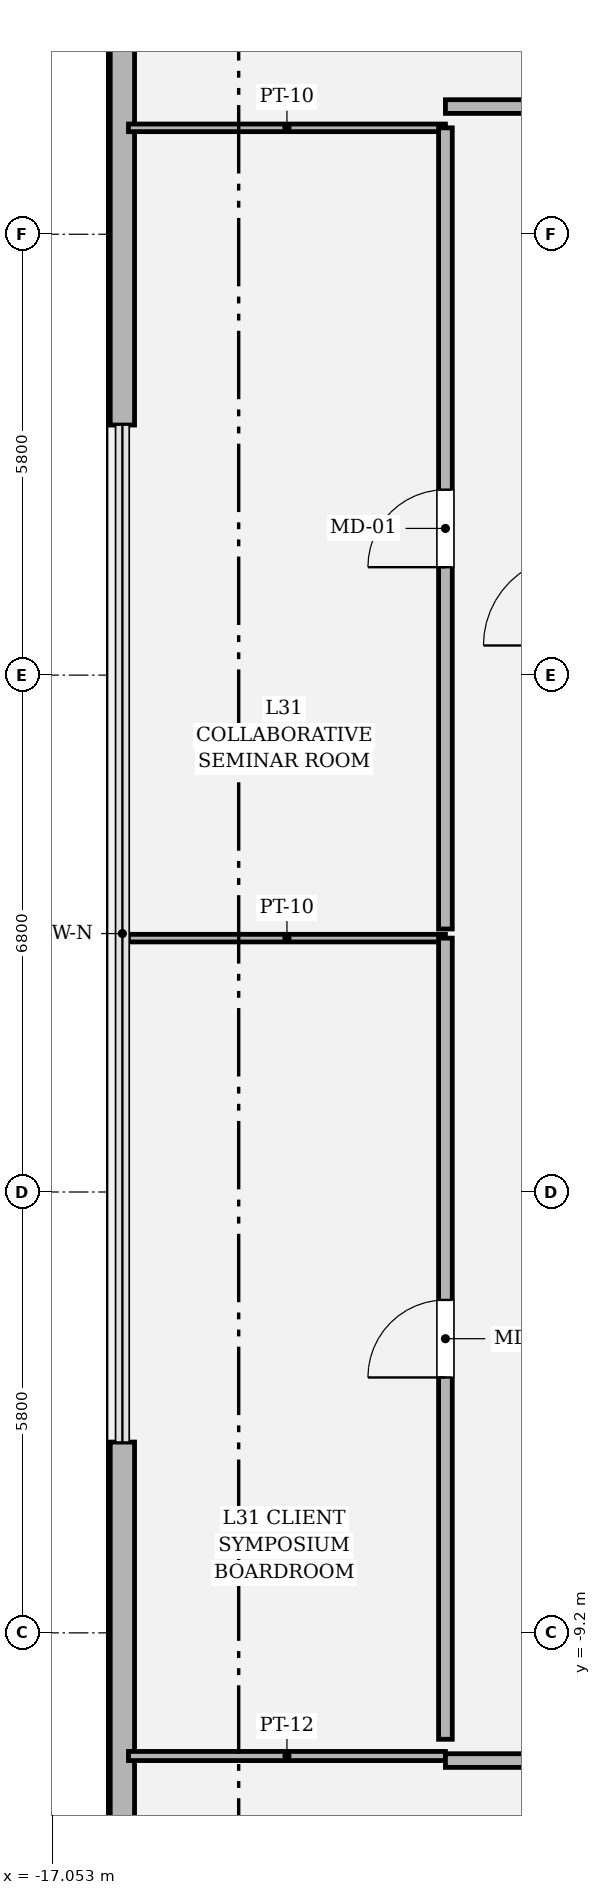
"""IFC4 building model, lengths in metres.
Left out: names, types, materials, properties, quantities, classifications, styles, units other than length and angle.
Written with IfcOpenShell. Run it as: python <this file> out.ifc"""

import sys

from ifc_helpers import new_model, si_unit, direction, frame, frame_2d, origin, place, context, subcontext, project, spatial, rectangle, extrude, element, fill, save


model = new_model("IFC4")
c1 = context("Model", 3, precision=1e-05, world=origin(), true_north=direction((0.0, 1.0)))
c2 = subcontext(c1, "Body", "Model", "MODEL_VIEW")
j1 = project(units=[si_unit("LENGTHUNIT", "METRE"), si_unit("PLANEANGLEUNIT", "RADIAN")], contexts=[c1])
p1 = place(None, origin())
s1 = spatial("IfcSite", under=j1, at=p1, CompositionType="ELEMENT")
p2 = place(p1, origin())
s2 = spatial("IfcBuilding", under=s1, at=p2, CompositionType="ELEMENT")
p3 = place(p2, frame((0.0, 0.0, 135.0)))
s3 = spatial("IfcBuildingStorey", under=s2, at=p3, CompositionType="ELEMENT", Elevation=135.0)
for number, where, z_axis, x_axis in (
    (1, (-16.13, 13.727, 0.0), (0.0, 0.0, 1.0), (0.0, -1.0, 0.0)),
    (2, (-16.13, -6.69, 0.0), (0.0, 0.0, 1.0), (0.0, -1.0, 0.0)),
):
    element("IfcWall", number, at=place(p3, frame(where, z_axis=z_axis, x_axis=x_axis)), inside=s3, PredefinedType="SOLIDWALL", context=c2, shape_type="SweptSolid", body=[
        extrude(rectangle(XDim=7.037, YDim=0.32, at=frame_2d((3.519, 0.0))), origin(), (0.0, 0.0, 1.0), 3.194),
    ])
p4 = place(p3, frame((-16.05, -10.82, 0.0), z_axis=(0.0, 0.0, 1.0), x_axis=(1.0, 0.0, 0.0)))
e3 = element("IfcWall", 3, at=p4, inside=s3, PredefinedType="PARTITIONING", context=c2, shape_type="SweptSolid", body=[
    extrude(rectangle(XDim=4.17, YDim=0.12, at=frame_2d((2.085, 0.0))), origin(), (0.0, 0.0, 1.0), 4.114),
])
p5 = place(p3, frame((-11.88, -10.88, 0.0), z_axis=(0.0, 0.0, 1.0), x_axis=(1.0, 0.0, 0.0)))
e4 = element("IfcWall", 4, at=p5, inside=s3, PredefinedType="PARTITIONING", context=c2, shape_type="SweptSolid", body=[
    extrude(rectangle(XDim=10.474, YDim=0.18, at=frame_2d((5.237, 0.0))), origin(), (0.0, 0.0, 1.0), 3.194),
])
p6 = place(p5, frame((4.712, 0.0, 0.0)))
e5 = element("IfcOpeningElement", 5, at=p6, cuts=e4, PredefinedType="OPENING", context=c2, shape_type="SweptSolid", body=[
    extrude(rectangle(XDim=1.05, YDim=2.2, at=frame_2d((0.525, 1.1))), frame((0.0, 0.1, 0.0), z_axis=(0.0, -1.0, 0.0), x_axis=(1.0, 0.0, 0.0)), (0.0, 0.0, 1.0), 0.2),
])
p7 = place(p3, frame((-16.05, -0.06, 0.0), z_axis=(0.0, 0.0, 1.0), x_axis=(1.0, 0.0, 0.0)))
e6 = element("IfcWall", 6, at=p7, inside=s3, PredefinedType="PARTITIONING", context=c2, shape_type="SweptSolid", body=[
    extrude(rectangle(XDim=4.17, YDim=0.1, at=frame_2d((2.085, 0.0))), origin(), (0.0, 0.0, 1.0), 4.52),
])
p8 = place(p3, frame((-11.88, -0.06, 0.0), z_axis=(0.0, 0.0, 1.0), x_axis=(0.0, -1.0, 0.0)))
e7 = element("IfcWall", 7, at=p8, inside=s3, PredefinedType="PARTITIONING", context=c2, shape_type="SweptSolid", body=[
    extrude(rectangle(XDim=10.54, YDim=0.18, at=frame_2d((5.27, 0.0))), origin(), (0.0, 0.0, 1.0), 3.194),
])
p9 = place(p8, frame((4.76, 0.0, 0.0)))
e8 = element("IfcOpeningElement", 8, at=p9, cuts=e7, PredefinedType="OPENING", context=c2, shape_type="SweptSolid", body=[
    extrude(rectangle(XDim=1.02, YDim=2.2, at=frame_2d((0.51, 1.1))), frame((0.0, 0.1, 0.0), z_axis=(0.0, -1.0, 0.0), x_axis=(1.0, 0.0, 0.0)), (0.0, 0.0, 1.0), 0.2),
])
p10 = place(p3, frame((-16.05, 10.6, 0.0), z_axis=(0.0, 0.0, 1.0), x_axis=(1.0, 0.0, 0.0)))
e9 = element("IfcWall", 9, at=p10, inside=s3, PredefinedType="PARTITIONING", context=c2, shape_type="SweptSolid", body=[
    extrude(rectangle(XDim=4.17, YDim=0.1, at=frame_2d((2.085, 0.0))), origin(), (0.0, 0.0, 1.0), 4.114),
])
p11 = place(p3, frame((-11.88, 10.6, 0.0), z_axis=(0.0, 0.0, 1.0), x_axis=(0.0, -1.0, 0.0)))
e10 = element("IfcWall", 10, at=p11, inside=s3, PredefinedType="PARTITIONING", context=c2, shape_type="SweptSolid", body=[
    extrude(rectangle(XDim=10.54, YDim=0.18, at=frame_2d((5.27, 0.0))), origin(), (0.0, 0.0, 1.0), 3.194),
])
p12 = place(p11, frame((4.76, 0.0, 0.0)))
e11 = element("IfcOpeningElement", 11, at=p12, cuts=e10, PredefinedType="OPENING", context=c2, shape_type="SweptSolid", body=[
    extrude(rectangle(XDim=1.02, YDim=2.2, at=frame_2d((0.51, 1.1))), frame((0.0, 0.1, 0.0), z_axis=(0.0, -1.0, 0.0), x_axis=(1.0, 0.0, 0.0)), (0.0, 0.0, 1.0), 0.2),
])
p13 = place(p3, frame((-1.406, 10.88, 0.0), z_axis=(0.0, 0.0, 1.0), x_axis=(-1.0, 0.0, 0.0)))
e12 = element("IfcWall", 12, at=p13, inside=s3, PredefinedType="PARTITIONING", context=c2, shape_type="SweptSolid", body=[
    extrude(rectangle(XDim=10.474, YDim=0.18, at=frame_2d((5.237, 0.0))), origin(), (0.0, 0.0, 1.0), 3.194),
])
p14 = place(p13, frame((4.712, 0.0, 0.0)))
e13 = element("IfcOpeningElement", 13, at=p14, cuts=e12, PredefinedType="OPENING", context=c2, shape_type="SweptSolid", body=[
    extrude(rectangle(XDim=1.05, YDim=2.2, at=frame_2d((0.525, 1.1))), frame((0.0, 0.1, 0.0), z_axis=(0.0, -1.0, 0.0), x_axis=(1.0, 0.0, 0.0)), (0.0, 0.0, 1.0), 0.2),
])
p15 = place(p9, origin())
e14 = element("IfcDoor", 14, at=p15, inside=s3, OperationType="SINGLE_SWING_RIGHT", PredefinedType="DOOR", context=c2, shape_type="SweptSolid", body=[
    extrude(rectangle(XDim=1.02, YDim=2.2, at=frame_2d((0.51, 1.1))), frame((0.0, 0.025, 0.0), z_axis=(0.0, -1.0, 0.0), x_axis=(1.0, 0.0, 0.0)), (0.0, 0.0, 1.0), 0.05),
])
fill(e8, e14)
p16 = place(p12, origin())
e15 = element("IfcDoor", 15, at=p16, inside=s3, OperationType="SINGLE_SWING_RIGHT", PredefinedType="DOOR", context=c2, shape_type="SweptSolid", body=[
    extrude(rectangle(XDim=1.02, YDim=2.2, at=frame_2d((0.51, 1.1))), frame((0.0, 0.025, 0.0), z_axis=(0.0, -1.0, 0.0), x_axis=(1.0, 0.0, 0.0)), (0.0, 0.0, 1.0), 0.05),
])
fill(e11, e15)
save(model, sys.argv[1])
